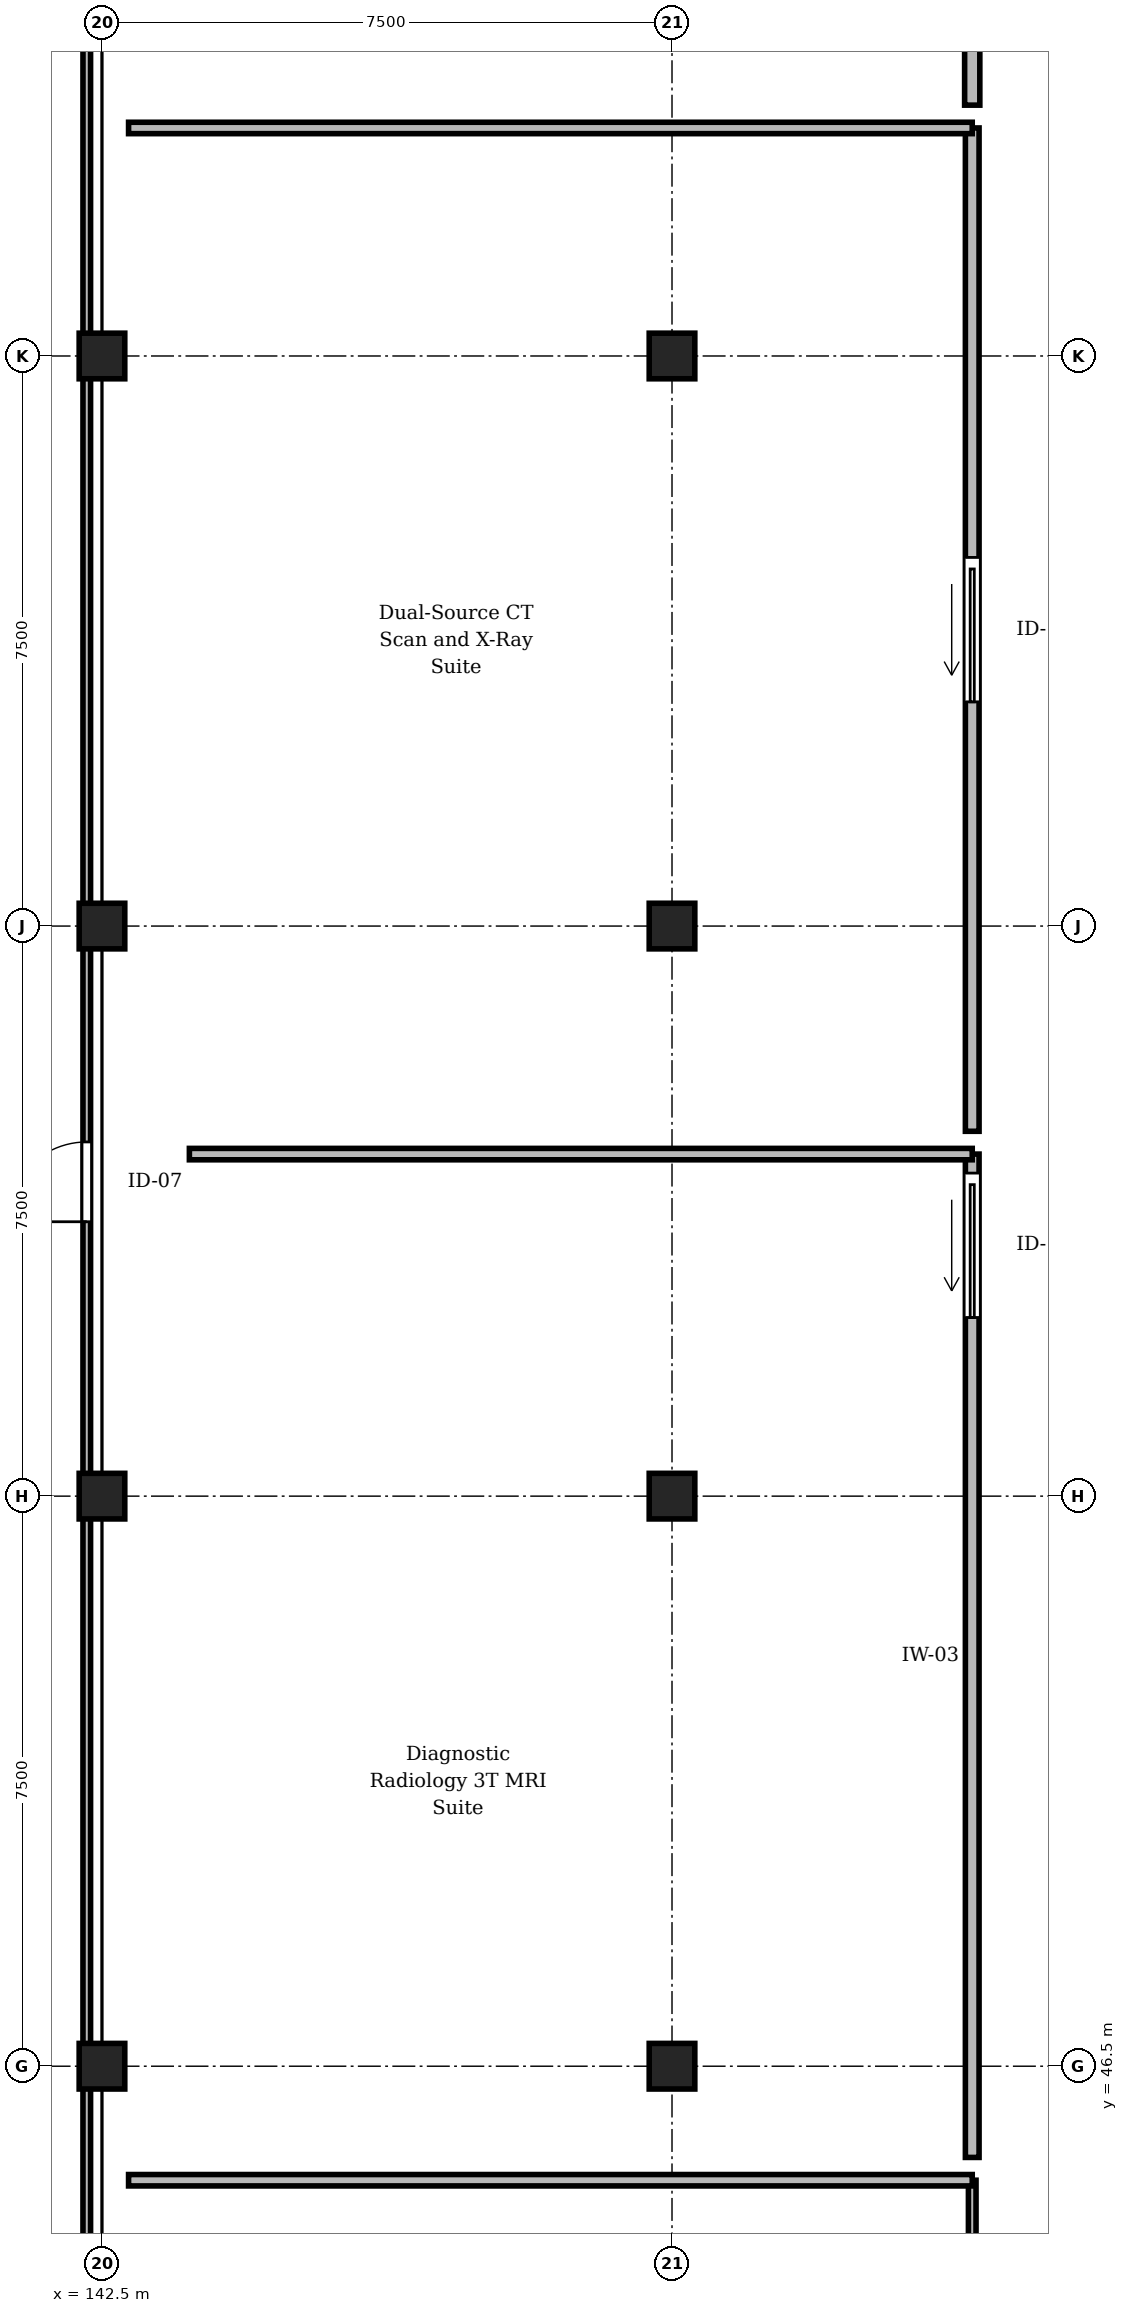
"""IFC4 building model, lengths in metres.
Left out: names, types, materials, properties, quantities, classifications, styles, units other than length and angle.
Written with IfcOpenShell. Run it as: python <this file> out.ifc"""

import sys

from ifc_helpers import new_model, si_unit, direction, frame, frame_2d, origin, origin_2d, place, context, subcontext, project, spatial, rectangle, circle, extrude, element, fill, save


model = new_model("IFC4")
c1 = context("Model", 3, precision=1e-05, world=origin(), true_north=direction((0.0, 1.0)))
c2 = subcontext(c1, "Body", "Model", "MODEL_VIEW")
j1 = project(units=[si_unit("LENGTHUNIT", "METRE"), si_unit("PLANEANGLEUNIT", "RADIAN")], contexts=[c1])
p1 = place(None, origin())
s1 = spatial("IfcSite", under=j1, at=p1, CompositionType="ELEMENT")
p2 = place(p1, origin())
s2 = spatial("IfcBuilding", under=s1, at=p2, CompositionType="ELEMENT")
p3 = place(p2, origin())
s3 = spatial("IfcBuildingStorey", under=s2, at=p3, CompositionType="ELEMENT", Elevation=0.0)
for number, where, z_axis, x_axis in (
    (1, (142.5, 46.5, 0.0), (0.0, 0.0, 1.0), (1.0, 0.0, 0.0)),
    (2, (142.5, 54.0, 0.0), (0.0, 0.0, 1.0), (1.0, 0.0, 0.0)),
):
    element("IfcColumn", number, at=place(p3, frame(where, z_axis=z_axis, x_axis=x_axis)), inside=s3, PredefinedType="COLUMN", context=c2, shape_type="SweptSolid", body=[
        extrude(rectangle(XDim=0.6, YDim=0.6, at=origin_2d()), origin(), (0.0, 0.0, 1.0), 4.8),
    ])
p4 = place(p3, frame((142.5, 61.5, 0.0), z_axis=(0.0, 0.0, 1.0), x_axis=(1.0, 0.0, 0.0)))
e3 = element("IfcColumn", 3, at=p4, inside=s3, PredefinedType="COLUMN", context=c2, shape_type="SweptSolid", body=[
    extrude(circle(Radius=0.3, at=origin_2d()), origin(), (0.0, 0.0, 1.0), 4.8),
])
for number, where, z_axis, x_axis in (
    (4, (142.5, 69.0, 0.0), (0.0, 0.0, 1.0), (1.0, 0.0, 0.0)),
    (5, (150.0, 46.5, 0.0), (0.0, 0.0, 1.0), (1.0, 0.0, 0.0)),
):
    element("IfcColumn", number, at=place(p3, frame(where, z_axis=z_axis, x_axis=x_axis)), inside=s3, PredefinedType="COLUMN", context=c2, shape_type="SweptSolid", body=[
        extrude(rectangle(XDim=0.6, YDim=0.6, at=origin_2d()), origin(), (0.0, 0.0, 1.0), 4.8),
    ])
p5 = place(p3, frame((150.0, 54.0, 0.0), z_axis=(0.0, 0.0, 1.0), x_axis=(1.0, 0.0, 0.0)))
e6 = element("IfcColumn", 6, at=p5, inside=s3, PredefinedType="COLUMN", context=c2, shape_type="SweptSolid", body=[
    extrude(circle(Radius=0.3, at=origin_2d()), origin(), (0.0, 0.0, 1.0), 4.8),
])
for number, where, z_axis, x_axis in (
    (7, (150.0, 61.5, 0.0), (0.0, 0.0, 1.0), (1.0, 0.0, 0.0)),
    (8, (150.0, 69.0, 0.0), (0.0, 0.0, 1.0), (1.0, 0.0, 0.0)),
):
    element("IfcColumn", number, at=place(p3, frame(where, z_axis=z_axis, x_axis=x_axis)), inside=s3, PredefinedType="COLUMN", context=c2, shape_type="SweptSolid", body=[
        extrude(rectangle(XDim=0.6, YDim=0.6, at=origin_2d()), origin(), (0.0, 0.0, 1.0), 4.8),
    ])
p6 = place(p3, frame((142.3, 31.5, 0.0), z_axis=(0.0, 0.0, 1.0), x_axis=(0.0, 1.0, 0.0)))
e9 = element("IfcWall", 9, at=p6, inside=s3, PredefinedType="PARTITIONING", context=c2, shape_type="SweptSolid", body=[
    extrude(rectangle(XDim=44.65, YDim=0.1, at=frame_2d((22.325, 0.0))), origin(), (0.0, 0.0, 1.0), 3.935),
])
p7 = place(p6, frame((26.11, 0.0, 0.0)))
e10 = element("IfcOpeningElement", 10, at=p7, cuts=e9, PredefinedType="OPENING", context=c2, shape_type="SweptSolid", body=[
    extrude(rectangle(XDim=1.05, YDim=2.2, at=frame_2d((0.525, 1.1))), frame((0.0, 0.06, 0.0), z_axis=(0.0, -1.0, 0.0), x_axis=(1.0, 0.0, 0.0)), (0.0, 0.0, 1.0), 0.12),
])
p8 = place(p3, frame((153.95, 31.85, 0.0), z_axis=(0.0, 0.0, 1.0), x_axis=(0.0, 1.0, 0.0)))
e11 = element("IfcWall", 11, at=p8, inside=s3, PredefinedType="PARTITIONING", context=c2, shape_type="SweptSolid", body=[
    extrude(rectangle(XDim=13.15, YDim=0.1, at=frame_2d((6.575, 0.0))), origin(), (0.0, 0.0, 1.0), 4.485),
])
p9 = place(p8, frame((9.925, 0.0, 0.0)))
e12 = element("IfcOpeningElement", 12, at=p9, cuts=e11, PredefinedType="OPENING", context=c2, shape_type="SweptSolid", body=[
    extrude(rectangle(XDim=1.9, YDim=2.45, at=frame_2d((0.95, 1.225))), frame((0.0, 0.06, 0.0), z_axis=(0.0, -1.0, 0.0), x_axis=(1.0, 0.0, 0.0)), (0.0, 0.0, 1.0), 0.12),
])
p10 = place(p3, frame((153.95, 45.3, 0.0), z_axis=(0.0, 0.0, 1.0), x_axis=(0.0, 1.0, 0.0)))
e13 = element("IfcWall", 13, at=p10, inside=s3, PredefinedType="PARTITIONING", context=c2, shape_type="SweptSolid", body=[
    extrude(rectangle(XDim=13.2, YDim=0.18, at=frame_2d((6.6, 0.0))), origin(), (0.0, 0.0, 1.0), 4.485),
])
p11 = place(p10, frame((11.05, 0.0, 0.0)))
e14 = element("IfcOpeningElement", 14, at=p11, cuts=e13, PredefinedType="OPENING", context=c2, shape_type="SweptSolid", body=[
    extrude(rectangle(XDim=1.9, YDim=2.45, at=frame_2d((0.95, 1.225))), frame((0.0, 0.1, 0.0), z_axis=(0.0, -1.0, 0.0), x_axis=(1.0, 0.0, 0.0)), (0.0, 0.0, 1.0), 0.2),
])
p12 = place(p3, frame((153.95, 58.8, 0.0), z_axis=(0.0, 0.0, 1.0), x_axis=(0.0, 1.0, 0.0)))
e15 = element("IfcWall", 15, at=p12, inside=s3, PredefinedType="PARTITIONING", context=c2, shape_type="SweptSolid", body=[
    extrude(rectangle(XDim=13.2, YDim=0.18, at=frame_2d((6.6, 0.0))), origin(), (0.0, 0.0, 1.0), 4.485),
])
p13 = place(p12, frame((5.65, 0.0, 0.0)))
e16 = element("IfcOpeningElement", 16, at=p13, cuts=e15, PredefinedType="OPENING", context=c2, shape_type="SweptSolid", body=[
    extrude(rectangle(XDim=1.9, YDim=2.45, at=frame_2d((0.95, 1.225))), frame((0.0, 0.1, 0.0), z_axis=(0.0, -1.0, 0.0), x_axis=(1.0, 0.0, 0.0)), (0.0, 0.0, 1.0), 0.2),
])
p14 = place(p3, frame((153.95, 72.3, 0.0), z_axis=(0.0, 0.0, 1.0), x_axis=(0.0, 1.0, 0.0)))
e17 = element("IfcWall", 17, at=p14, inside=s3, PredefinedType="STANDARD", context=c2, shape_type="SweptSolid", body=[
    extrude(rectangle(XDim=20.35, YDim=0.2, at=frame_2d((10.175, 0.0))), origin(), (0.0, 0.0, 1.0), 4.085),
])
p15 = place(p14, frame((7.77, 0.0, 0.0)))
e18 = element("IfcOpeningElement", 18, at=p15, cuts=e17, PredefinedType="OPENING", context=c2, shape_type="SweptSolid", body=[
    extrude(rectangle(XDim=1.05, YDim=2.2, at=frame_2d((0.525, 1.1))), frame((0.0, 0.11, 0.0), z_axis=(0.0, -1.0, 0.0), x_axis=(1.0, 0.0, 0.0)), (0.0, 0.0, 1.0), 0.22),
])
p16 = place(p3, frame((142.85, 45.0, 0.0), z_axis=(0.0, 0.0, 1.0), x_axis=(1.0, 0.0, 0.0)))
e19 = element("IfcWall", 19, at=p16, inside=s3, PredefinedType="PARTITIONING", context=c2, shape_type="SweptSolid", body=[
    extrude(rectangle(XDim=11.1, YDim=0.15, at=frame_2d((5.55, 0.0))), origin(), (0.0, 0.0, 1.0), 4.485),
])
p17 = place(p3, frame((143.65, 58.5, 0.0), z_axis=(0.0, 0.0, 1.0), x_axis=(1.0, 0.0, 0.0)))
e20 = element("IfcWall", 20, at=p17, inside=s3, PredefinedType="PARTITIONING", context=c2, shape_type="SweptSolid", body=[
    extrude(rectangle(XDim=10.3, YDim=0.15, at=frame_2d((5.15, 0.0))), origin(), (0.0, 0.0, 1.0), 4.485),
])
p18 = place(p3, frame((142.85, 72.0, 0.0), z_axis=(0.0, 0.0, 1.0), x_axis=(1.0, 0.0, 0.0)))
e21 = element("IfcWall", 21, at=p18, inside=s3, PredefinedType="PARTITIONING", context=c2, shape_type="SweptSolid", body=[
    extrude(rectangle(XDim=11.1, YDim=0.15, at=frame_2d((5.55, 0.0))), origin(), (0.0, 0.0, 1.0), 4.485),
])
p19 = place(p7, origin())
e22 = element("IfcDoor", 22, at=p19, inside=s3, OperationType="SINGLE_SWING_LEFT", PredefinedType="DOOR", context=c2, shape_type="SweptSolid", body=[
    extrude(rectangle(XDim=1.05, YDim=2.2, at=frame_2d((0.525, 1.1))), frame((0.0, 0.025, 0.0), z_axis=(0.0, -1.0, 0.0), x_axis=(1.0, 0.0, 0.0)), (0.0, 0.0, 1.0), 0.05),
])
fill(e10, e22)
p20 = place(p11, origin())
e23 = element("IfcDoor", 23, at=p20, inside=s3, OperationType="DOUBLE_DOOR_SLIDING", PredefinedType="DOOR", context=c2, shape_type="SweptSolid", body=[
    extrude(rectangle(XDim=1.9, YDim=2.45, at=frame_2d((0.95, 1.225))), frame((0.0, 0.025, 0.0), z_axis=(0.0, -1.0, 0.0), x_axis=(1.0, 0.0, 0.0)), (0.0, 0.0, 1.0), 0.05),
])
fill(e14, e23)
p21 = place(p13, origin())
e24 = element("IfcDoor", 24, at=p21, inside=s3, OperationType="DOUBLE_DOOR_SLIDING", PredefinedType="DOOR", context=c2, shape_type="SweptSolid", body=[
    extrude(rectangle(XDim=1.9, YDim=2.45, at=frame_2d((0.95, 1.225))), frame((0.0, 0.025, 0.0), z_axis=(0.0, -1.0, 0.0), x_axis=(1.0, 0.0, 0.0)), (0.0, 0.0, 1.0), 0.05),
])
fill(e16, e24)
save(model, sys.argv[1])
